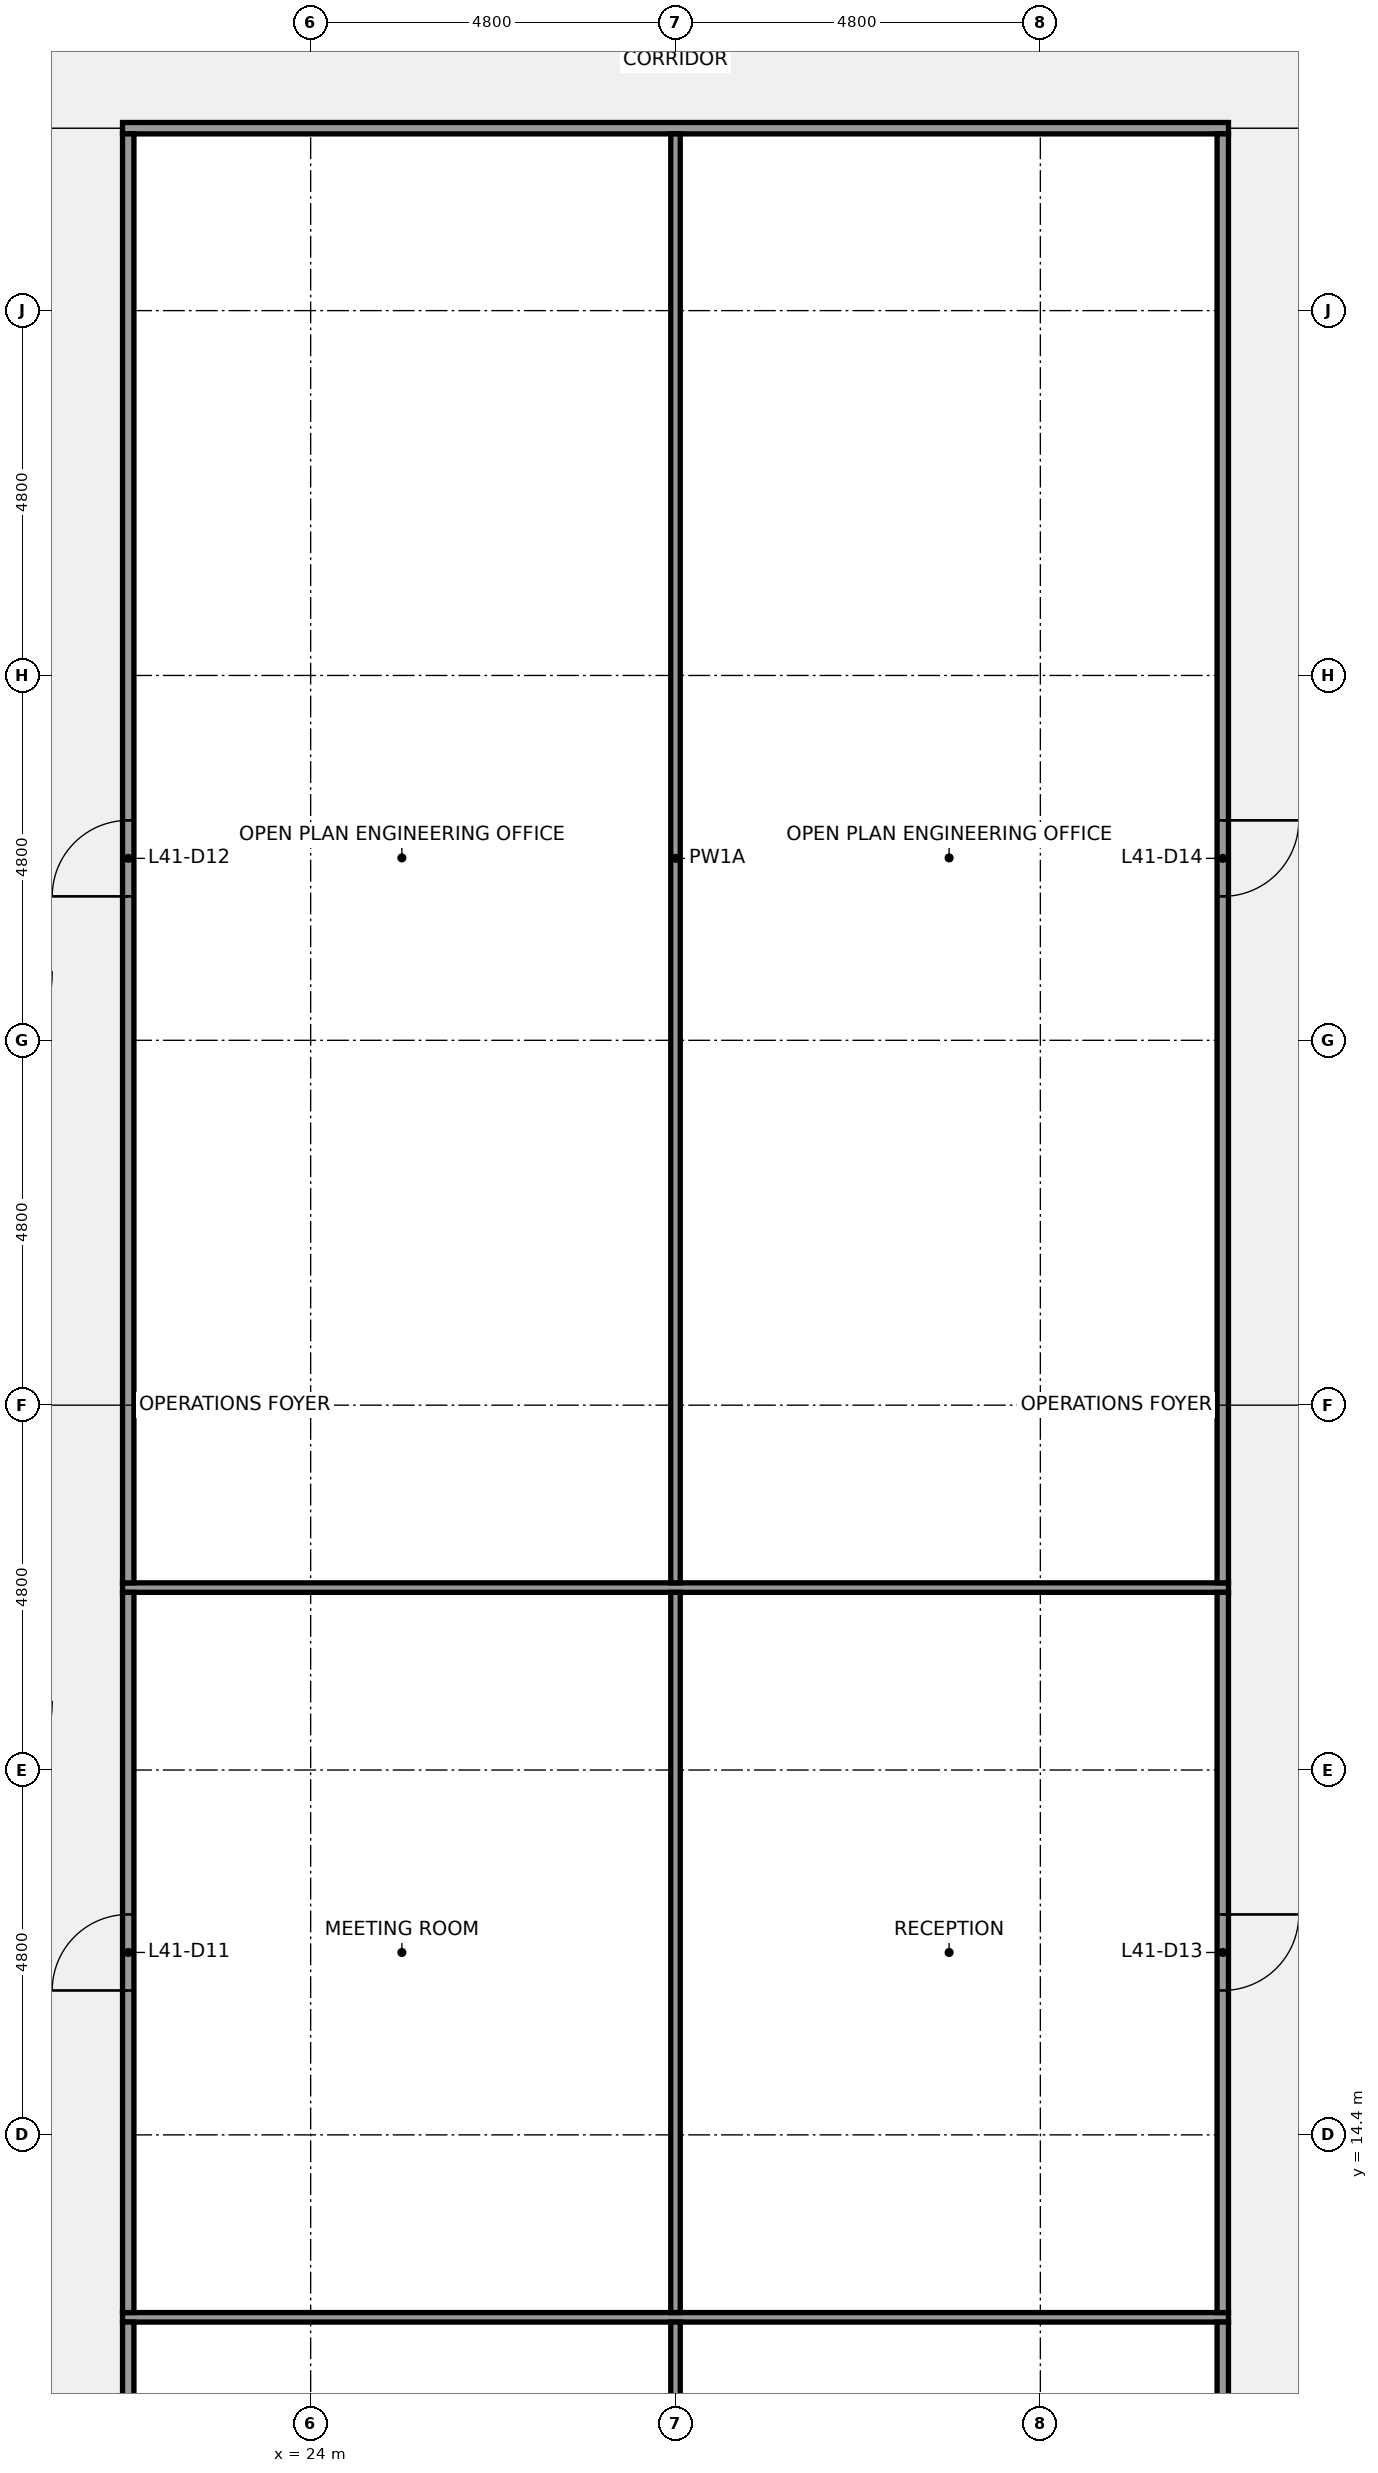
"""IFC4 building model, lengths in metres.
Left out: names, types, materials, properties, quantities, classifications, styles, units other than length and angle.
Written with IfcOpenShell. Run it as: python <this file> out.ifc"""

import sys

from ifc_helpers import new_model, si_unit, direction, frame, frame_2d, origin, place, context, subcontext, project, spatial, rectangle, extrude, element, fill, save


model = new_model("IFC4")
c1 = context("Model", 3, precision=1e-05, world=origin(), true_north=direction((0.0, 1.0)))
c2 = subcontext(c1, "Body", "Model", "MODEL_VIEW")
j1 = project(units=[si_unit("LENGTHUNIT", "METRE"), si_unit("PLANEANGLEUNIT", "RADIAN")], contexts=[c1])
p1 = place(None, origin())
s1 = spatial("IfcSite", under=j1, at=p1, CompositionType="ELEMENT")
p2 = place(p1, origin())
s2 = spatial("IfcBuilding", under=s1, at=p2, CompositionType="ELEMENT")
p3 = place(p2, frame((0.0, 0.0, 193.2)))
s3 = spatial("IfcBuildingStorey", under=s2, at=p3, CompositionType="ELEMENT", Elevation=193.2)
for number, where, z_axis, x_axis in (
    (1, (21.525, 12.0, 0.0), (0.0, 0.0, 1.0), (1.0, 0.0, 0.0)),
    (2, (21.525, 21.6, 0.0), (0.0, 0.0, 1.0), (1.0, 0.0, 0.0)),
):
    element("IfcWall", number, at=place(p3, frame(where, z_axis=z_axis, x_axis=x_axis)), inside=s3, PredefinedType="PARTITIONING", context=c2, shape_type="SweptSolid", body=[
        extrude(rectangle(XDim=14.55, YDim=0.125, at=frame_2d((7.275, 0.0))), origin(), (0.0, 0.0, 1.0), 2.849),
    ])
p4 = place(p3, frame((21.525, 40.8, 0.0), z_axis=(0.0, 0.0, 1.0), x_axis=(1.0, 0.0, 0.0)))
e3 = element("IfcWall", 3, at=p4, inside=s3, PredefinedType="PARTITIONING", context=c2, shape_type="SweptSolid", body=[
    extrude(rectangle(XDim=14.55, YDim=0.15, at=frame_2d((7.275, 0.0))), origin(), (0.0, 0.0, 1.0), 2.849),
])
p5 = place(p3, frame((21.6, 7.275, 0.0), z_axis=(0.0, 0.0, 1.0), x_axis=(0.0, 1.0, 0.0)))
e4 = element("IfcWall", 4, at=p5, inside=s3, PredefinedType="PARTITIONING", context=c2, shape_type="SweptSolid", body=[
    extrude(rectangle(XDim=4.663, YDim=0.15, at=frame_2d((2.331, 0.0))), origin(), (0.0, 0.0, 1.0), 2.849),
])
p6 = place(p3, frame((21.6, 12.062, 0.0), z_axis=(0.0, 0.0, 1.0), x_axis=(0.0, 1.0, 0.0)))
e5 = element("IfcWall", 5, at=p6, inside=s3, PredefinedType="PARTITIONING", context=c2, shape_type="SweptSolid", body=[
    extrude(rectangle(XDim=9.475, YDim=0.15, at=frame_2d((4.738, 0.0))), origin(), (0.0, 0.0, 1.0), 2.849),
])
p7 = place(p6, frame((4.238, 0.0, 0.0)))
e6 = element("IfcOpeningElement", 6, at=p7, cuts=e5, PredefinedType="OPENING", context=c2, shape_type="SweptSolid", body=[
    extrude(rectangle(XDim=1.0, YDim=2.1, at=frame_2d((0.5, 1.05))), frame((0.0, 0.085, 0.0), z_axis=(0.0, -1.0, 0.0), x_axis=(1.0, 0.0, 0.0)), (0.0, 0.0, 1.0), 0.17),
])
p8 = place(p3, frame((21.6, 21.663, 0.0), z_axis=(0.0, 0.0, 1.0), x_axis=(0.0, 1.0, 0.0)))
e7 = element("IfcWall", 7, at=p8, inside=s3, PredefinedType="PARTITIONING", context=c2, shape_type="SweptSolid", body=[
    extrude(rectangle(XDim=19.062, YDim=0.15, at=frame_2d((9.531, 0.0))), origin(), (0.0, 0.0, 1.0), 2.849),
])
p9 = place(p8, frame((9.031, 0.0, 0.0)))
e8 = element("IfcOpeningElement", 8, at=p9, cuts=e7, PredefinedType="OPENING", context=c2, shape_type="SweptSolid", body=[
    extrude(rectangle(XDim=1.0, YDim=2.1, at=frame_2d((0.5, 1.05))), frame((0.0, 0.085, 0.0), z_axis=(0.0, -1.0, 0.0), x_axis=(1.0, 0.0, 0.0)), (0.0, 0.0, 1.0), 0.17),
])
p10 = place(p3, frame((28.8, 7.275, 0.0), z_axis=(0.0, 0.0, 1.0), x_axis=(0.0, 1.0, 0.0)))
e9 = element("IfcWall", 9, at=p10, inside=s3, PredefinedType="PARTITIONING", context=c2, shape_type="SweptSolid", body=[
    extrude(rectangle(XDim=4.663, YDim=0.125, at=frame_2d((2.331, 0.0))), origin(), (0.0, 0.0, 1.0), 2.849),
])
p11 = place(p3, frame((28.8, 12.062, 0.0), z_axis=(0.0, 0.0, 1.0), x_axis=(0.0, 1.0, 0.0)))
e10 = element("IfcWall", 10, at=p11, inside=s3, PredefinedType="PARTITIONING", context=c2, shape_type="SweptSolid", body=[
    extrude(rectangle(XDim=9.475, YDim=0.125, at=frame_2d((4.738, 0.0))), origin(), (0.0, 0.0, 1.0), 2.849),
])
p12 = place(p3, frame((28.8, 21.663, 0.0), z_axis=(0.0, 0.0, 1.0), x_axis=(0.0, 1.0, 0.0)))
e11 = element("IfcWall", 11, at=p12, inside=s3, PredefinedType="PARTITIONING", context=c2, shape_type="SweptSolid", body=[
    extrude(rectangle(XDim=19.062, YDim=0.125, at=frame_2d((9.531, 0.0))), origin(), (0.0, 0.0, 1.0), 2.849),
])
p13 = place(p3, frame((36.0, 7.275, 0.0), z_axis=(0.0, 0.0, 1.0), x_axis=(0.0, 1.0, 0.0)))
e12 = element("IfcWall", 12, at=p13, inside=s3, PredefinedType="PARTITIONING", context=c2, shape_type="SweptSolid", body=[
    extrude(rectangle(XDim=4.663, YDim=0.15, at=frame_2d((2.331, 0.0))), origin(), (0.0, 0.0, 1.0), 2.849),
])
p14 = place(p3, frame((36.0, 12.062, 0.0), z_axis=(0.0, 0.0, 1.0), x_axis=(0.0, 1.0, 0.0)))
e13 = element("IfcWall", 13, at=p14, inside=s3, PredefinedType="PARTITIONING", context=c2, shape_type="SweptSolid", body=[
    extrude(rectangle(XDim=9.475, YDim=0.15, at=frame_2d((4.738, 0.0))), origin(), (0.0, 0.0, 1.0), 2.849),
])
p15 = place(p14, frame((4.238, 0.0, 0.0)))
e14 = element("IfcOpeningElement", 14, at=p15, cuts=e13, PredefinedType="OPENING", context=c2, shape_type="SweptSolid", body=[
    extrude(rectangle(XDim=1.0, YDim=2.1, at=frame_2d((0.5, 1.05))), frame((0.0, 0.085, 0.0), z_axis=(0.0, -1.0, 0.0), x_axis=(1.0, 0.0, 0.0)), (0.0, 0.0, 1.0), 0.17),
])
p16 = place(p3, frame((36.0, 21.663, 0.0), z_axis=(0.0, 0.0, 1.0), x_axis=(0.0, 1.0, 0.0)))
e15 = element("IfcWall", 15, at=p16, inside=s3, PredefinedType="PARTITIONING", context=c2, shape_type="SweptSolid", body=[
    extrude(rectangle(XDim=19.062, YDim=0.15, at=frame_2d((9.531, 0.0))), origin(), (0.0, 0.0, 1.0), 2.849),
])
p17 = place(p16, frame((9.031, 0.0, 0.0)))
e16 = element("IfcOpeningElement", 16, at=p17, cuts=e15, PredefinedType="OPENING", context=c2, shape_type="SweptSolid", body=[
    extrude(rectangle(XDim=1.0, YDim=2.1, at=frame_2d((0.5, 1.05))), frame((0.0, 0.085, 0.0), z_axis=(0.0, -1.0, 0.0), x_axis=(1.0, 0.0, 0.0)), (0.0, 0.0, 1.0), 0.17),
])
p18 = place(p7, origin())
e17 = element("IfcDoor", 17, at=p18, inside=s3, OperationType="SINGLE_SWING_LEFT", PredefinedType="DOOR", context=c2, shape_type="SweptSolid", body=[
    extrude(rectangle(XDim=1.0, YDim=2.1, at=frame_2d((0.5, 1.05))), frame((0.0, 0.025, 0.0), z_axis=(0.0, -1.0, 0.0), x_axis=(1.0, 0.0, 0.0)), (0.0, 0.0, 1.0), 0.05),
])
fill(e6, e17)
p19 = place(p9, origin())
e18 = element("IfcDoor", 18, at=p19, inside=s3, OperationType="SINGLE_SWING_LEFT", PredefinedType="DOOR", context=c2, shape_type="SweptSolid", body=[
    extrude(rectangle(XDim=1.0, YDim=2.1, at=frame_2d((0.5, 1.05))), frame((0.0, 0.025, 0.0), z_axis=(0.0, -1.0, 0.0), x_axis=(1.0, 0.0, 0.0)), (0.0, 0.0, 1.0), 0.05),
])
fill(e8, e18)
p20 = place(p15, origin())
e19 = element("IfcDoor", 19, at=p20, inside=s3, OperationType="SINGLE_SWING_RIGHT", PredefinedType="DOOR", context=c2, shape_type="SweptSolid", body=[
    extrude(rectangle(XDim=1.0, YDim=2.1, at=frame_2d((0.5, 1.05))), frame((0.0, 0.025, 0.0), z_axis=(0.0, -1.0, 0.0), x_axis=(1.0, 0.0, 0.0)), (0.0, 0.0, 1.0), 0.05),
])
fill(e14, e19)
p21 = place(p17, origin())
e20 = element("IfcDoor", 20, at=p21, inside=s3, OperationType="SINGLE_SWING_RIGHT", PredefinedType="DOOR", context=c2, shape_type="SweptSolid", body=[
    extrude(rectangle(XDim=1.0, YDim=2.1, at=frame_2d((0.5, 1.05))), frame((0.0, 0.025, 0.0), z_axis=(0.0, -1.0, 0.0), x_axis=(1.0, 0.0, 0.0)), (0.0, 0.0, 1.0), 0.05),
])
fill(e16, e20)
save(model, sys.argv[1])
